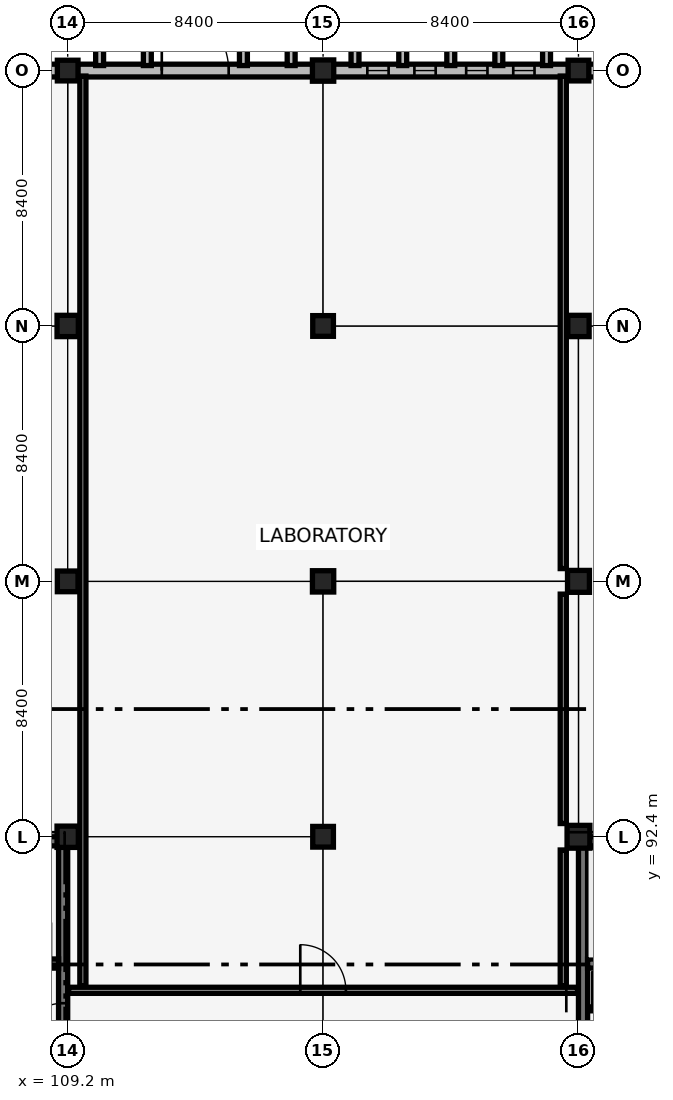
"""IFC4 building model, lengths in metres.
Left out: names, types, materials, properties, quantities, classifications, styles, units other than length and angle.
Written with IfcOpenShell. Run it as: python <this file> out.ifc"""

import sys

from ifc_helpers import new_model, si_unit, direction, frame, frame_2d, origin, origin_2d, place, context, subcontext, project, spatial, rectangle, extrude, element, fill, save


model = new_model("IFC4")
c1 = context("Model", 3, precision=1e-05, world=origin(), true_north=direction((0.0, 1.0)))
c2 = subcontext(c1, "Body", "Model", "MODEL_VIEW")
j1 = project(units=[si_unit("LENGTHUNIT", "METRE"), si_unit("PLANEANGLEUNIT", "RADIAN")], contexts=[c1])
p1 = place(None, origin())
s1 = spatial("IfcSite", under=j1, at=p1, CompositionType="ELEMENT")
p2 = place(p1, origin())
s2 = spatial("IfcBuilding", under=s1, at=p2, CompositionType="ELEMENT")
p3 = place(p2, origin())
s3 = spatial("IfcBuildingStorey", under=s2, at=p3, CompositionType="ELEMENT", Elevation=0.0)
for number, where, z_axis, x_axis in (
    (1, (126.15, 92.25, 0.0), (0.0, 0.0, 1.0), (1.0, 0.0, 0.0)),
    (2, (126.15, 84.15, 0.0), (0.0, 0.0, 1.0), (0.0, 1.0, 0.0)),
):
    element("IfcWall", number, at=place(p3, frame(where, z_axis=z_axis, x_axis=x_axis)), inside=s3, PredefinedType="SHEAR", context=c2, shape_type="SweptSolid", body=[
        extrude(rectangle(XDim=8.1, YDim=0.3, at=frame_2d((4.05, 0.0))), origin(), (0.0, 0.0, 1.0), 5.14),
    ])
p4 = place(p3, frame((126.3, 88.23, 0.0), z_axis=(0.0, 0.0, 1.0), x_axis=(1.0, 0.0, 0.0)))
e3 = element("IfcWall", 3, at=p4, inside=s3, PredefinedType="SHEAR", context=c2, shape_type="SweptSolid", body=[
    extrude(rectangle(XDim=7.8, YDim=0.3, at=frame_2d((3.9, 0.0))), origin(), (0.0, 0.0, 1.0), 5.14),
])
p5 = place(p4, frame((6.2, 0.0, 0.0)))
e4 = element("IfcOpeningElement", 4, at=p5, cuts=e3, PredefinedType="OPENING", context=c2, shape_type="SweptSolid", body=[
    extrude(rectangle(XDim=1.35, YDim=2.15, at=frame_2d((0.675, 1.075))), frame((0.0, 0.16, 0.0), z_axis=(0.0, -1.0, 0.0), x_axis=(1.0, 0.0, 0.0)), (0.0, 0.0, 1.0), 0.32),
])
p6 = place(p3, frame((100.95, 92.25, 0.0), z_axis=(0.0, 0.0, 1.0), x_axis=(1.0, 0.0, 0.0)))
e5 = element("IfcWall", 5, at=p6, inside=s3, PredefinedType="SHEAR", context=c2, shape_type="SweptSolid", body=[
    extrude(rectangle(XDim=8.1, YDim=0.3, at=frame_2d((4.05, 0.0))), origin(), (0.0, 0.0, 1.0), 5.14),
])
p7 = place(p3, frame((109.05, 84.15, 0.0), z_axis=(0.0, 0.0, 1.0), x_axis=(0.0, 1.0, 0.0)))
e6 = element("IfcWall", 6, at=p7, inside=s3, PredefinedType="SHEAR", context=c2, shape_type="SweptSolid", body=[
    extrude(rectangle(XDim=8.1, YDim=0.3, at=frame_2d((4.05, 0.0))), origin(), (0.0, 0.0, 1.0), 5.14),
])
p8 = place(p7, frame((1.325, 0.0, 0.0)))
e7 = element("IfcOpeningElement", 7, at=p8, cuts=e6, PredefinedType="OPENING", context=c2, shape_type="SweptSolid", body=[
    extrude(rectangle(XDim=1.45, YDim=2.15, at=frame_2d((0.725, 1.075))), frame((0.0, 0.16, 0.0), z_axis=(0.0, -1.0, 0.0), x_axis=(1.0, 0.0, 0.0)), (0.0, 0.0, 1.0), 0.32),
])
p9 = place(p3, frame((101.1, 88.23, 0.0), z_axis=(0.0, 0.0, 1.0), x_axis=(1.0, 0.0, 0.0)))
e8 = element("IfcWall", 8, at=p9, inside=s3, PredefinedType="SHEAR", context=c2, shape_type="SweptSolid", body=[
    extrude(rectangle(XDim=7.8, YDim=0.3, at=frame_2d((3.9, 0.0))), origin(), (0.0, 0.0, 1.0), 5.14),
])
p10 = place(p9, frame((6.2, 0.0, 0.0)))
e9 = element("IfcOpeningElement", 9, at=p10, cuts=e8, PredefinedType="OPENING", context=c2, shape_type="SweptSolid", body=[
    extrude(rectangle(XDim=1.35, YDim=2.15, at=frame_2d((0.675, 1.075))), frame((0.0, 0.16, 0.0), z_axis=(0.0, -1.0, 0.0), x_axis=(1.0, 0.0, 0.0)), (0.0, 0.0, 1.0), 0.32),
])
p11 = place(p3, frame((109.2, 92.4, 0.0), z_axis=(0.0, 0.0, 1.0), x_axis=(1.0, 0.0, 0.0)))
e10 = element("IfcColumn", 10, at=p11, inside=s3, PredefinedType="COLUMN", context=c2, shape_type="SweptSolid", body=[
    extrude(rectangle(XDim=0.7, YDim=0.7, at=origin_2d()), origin(), (0.0, 0.0, 1.0), 5.14),
])
p12 = place(p3, frame((109.2, 100.8, 0.0), z_axis=(0.0, 0.0, 1.0), x_axis=(1.0, 0.0, 0.0)))
e11 = element("IfcColumn", 11, at=p12, inside=s3, PredefinedType="COLUMN", context=c2, shape_type="SweptSolid", body=[
    extrude(rectangle(XDim=0.68, YDim=0.68, at=origin_2d()), origin(), (0.0, 0.0, 1.0), 5.14),
])
p13 = place(p3, frame((109.2, 109.2, 0.0), z_axis=(0.0, 0.0, 1.0), x_axis=(1.0, 0.0, 0.0)))
e12 = element("IfcColumn", 12, at=p13, inside=s3, PredefinedType="COLUMN", context=c2, shape_type="SweptSolid", body=[
    extrude(rectangle(XDim=0.7, YDim=0.7, at=origin_2d()), origin(), (0.0, 0.0, 1.0), 5.14),
])
for number, where, z_axis, x_axis in (
    (13, (109.2, 117.6, 0.0), (0.0, 0.0, 1.0), (1.0, 0.0, 0.0)),
    (14, (117.6, 92.4, 0.0), (0.0, 0.0, 1.0), (1.0, 0.0, 0.0)),
):
    element("IfcColumn", number, at=place(p3, frame(where, z_axis=z_axis, x_axis=x_axis)), inside=s3, PredefinedType="COLUMN", context=c2, shape_type="SweptSolid", body=[
        extrude(rectangle(XDim=0.68, YDim=0.68, at=origin_2d()), origin(), (0.0, 0.0, 1.0), 5.14),
    ])
p14 = place(p3, frame((117.6, 100.8, 0.0), z_axis=(0.0, 0.0, 1.0), x_axis=(1.0, 0.0, 0.0)))
e15 = element("IfcColumn", 15, at=p14, inside=s3, PredefinedType="COLUMN", context=c2, shape_type="SweptSolid", body=[
    extrude(rectangle(XDim=0.7, YDim=0.7, at=origin_2d()), origin(), (0.0, 0.0, 1.0), 5.14),
])
p15 = place(p3, frame((117.6, 109.2, 0.0), z_axis=(0.0, 0.0, 1.0), x_axis=(1.0, 0.0, 0.0)))
e16 = element("IfcColumn", 16, at=p15, inside=s3, PredefinedType="COLUMN", context=c2, shape_type="SweptSolid", body=[
    extrude(rectangle(XDim=0.68, YDim=0.68, at=origin_2d()), origin(), (0.0, 0.0, 1.0), 5.14),
])
p16 = place(p3, frame((117.6, 117.6, 0.0), z_axis=(0.0, 0.0, 1.0), x_axis=(1.0, 0.0, 0.0)))
e17 = element("IfcColumn", 17, at=p16, inside=s3, PredefinedType="COLUMN", context=c2, shape_type="SweptSolid", body=[
    extrude(rectangle(XDim=0.7, YDim=0.7, at=origin_2d()), origin(), (0.0, 0.0, 1.0), 5.14),
])
p17 = place(p3, frame((126.0, 92.4, 0.0), z_axis=(0.0, 0.0, 1.0), x_axis=(1.0, 0.0, 0.0)))
e18 = element("IfcColumn", 18, at=p17, inside=s3, PredefinedType="COLUMN", context=c2, shape_type="SweptSolid", body=[
    extrude(rectangle(XDim=0.75, YDim=0.75, at=origin_2d()), origin(), (0.0, 0.0, 1.0), 5.14),
])
p18 = place(p3, frame((126.0, 100.8, 0.0), z_axis=(0.0, 0.0, 1.0), x_axis=(1.0, 0.0, 0.0)))
e19 = element("IfcColumn", 19, at=p18, inside=s3, PredefinedType="COLUMN", context=c2, shape_type="SweptSolid", body=[
    extrude(rectangle(XDim=0.72, YDim=0.72, at=origin_2d()), origin(), (0.0, 0.0, 1.0), 5.14),
])
p19 = place(p3, frame((126.0, 109.2, 0.0), z_axis=(0.0, 0.0, 1.0), x_axis=(1.0, 0.0, 0.0)))
e20 = element("IfcColumn", 20, at=p19, inside=s3, PredefinedType="COLUMN", context=c2, shape_type="SweptSolid", body=[
    extrude(rectangle(XDim=0.7, YDim=0.7, at=origin_2d()), origin(), (0.0, 0.0, 1.0), 5.14),
])
p20 = place(p3, frame((126.0, 117.6, 0.0), z_axis=(0.0, 0.0, 1.0), x_axis=(1.0, 0.0, 0.0)))
e21 = element("IfcColumn", 21, at=p20, inside=s3, PredefinedType="COLUMN", context=c2, shape_type="SweptSolid", body=[
    extrude(rectangle(XDim=0.68, YDim=0.68, at=origin_2d()), origin(), (0.0, 0.0, 1.0), 5.14),
])
p21 = place(p3, frame((101.135, 117.6, 0.0), z_axis=(0.0, 0.0, 1.0), x_axis=(1.0, 0.0, 0.0)))
e22 = element("IfcWall", 22, at=p21, inside=s3, PredefinedType="SOLIDWALL", context=c2, shape_type="SweptSolid", body=[
    extrude(rectangle(XDim=7.74, YDim=0.42, at=frame_2d((3.87, 0.0))), origin(), (0.0, 0.0, 1.0), 4.4),
])
p22 = place(p3, frame((109.525, 117.6, 0.0), z_axis=(0.0, 0.0, 1.0), x_axis=(1.0, 0.0, 0.0)))
e23 = element("IfcWall", 23, at=p22, inside=s3, PredefinedType="SOLIDWALL", context=c2, shape_type="SweptSolid", body=[
    extrude(rectangle(XDim=7.74, YDim=0.42, at=frame_2d((3.87, 0.0))), origin(), (0.0, 0.0, 1.0), 4.4),
])
p23 = place(p22, frame((2.77, 0.0, 0.0)))
e24 = element("IfcOpeningElement", 24, at=p23, cuts=e23, PredefinedType="OPENING", context=c2, shape_type="SweptSolid", body=[
    extrude(rectangle(XDim=2.2, YDim=2.4, at=frame_2d((1.1, 1.2))), frame((0.0, 0.22, 0.0), z_axis=(0.0, -1.0, 0.0), x_axis=(1.0, 0.0, 0.0)), (0.0, 0.0, 1.0), 0.44),
])
for number, where, z_axis, x_axis in (
    (25, (110.25, 117.765, -0.25), (0.0, 0.0, 1.0), (0.0, 1.0, 0.0)),
    (26, (111.82, 117.765, -0.25), (0.0, 0.0, 1.0), (0.0, 1.0, 0.0)),
    (27, (114.98, 117.765, -0.25), (0.0, 0.0, 1.0), (0.0, 1.0, 0.0)),
    (28, (116.55, 117.765, -0.25), (0.0, 0.0, 1.0), (0.0, 1.0, 0.0)),
):
    element("IfcWall", number, at=place(p3, frame(where, z_axis=z_axis, x_axis=x_axis)), inside=s3, PredefinedType="SOLIDWALL", context=c2, shape_type="SweptSolid", body=[
        extrude(rectangle(XDim=0.7, YDim=0.26, at=frame_2d((0.35, 0.0))), origin(), (0.0, 0.0, 1.0), 5.69),
    ])
p24 = place(p3, frame((117.935, 117.6, 0.0), z_axis=(0.0, 0.0, 1.0), x_axis=(1.0, 0.0, 0.0)))
e29 = element("IfcWall", 29, at=p24, inside=s3, PredefinedType="SOLIDWALL", context=c2, shape_type="SweptSolid", body=[
    extrude(rectangle(XDim=7.74, YDim=0.42, at=frame_2d((3.87, 0.0))), origin(), (0.0, 0.0, 1.0), 4.4),
])
p25 = place(p24, frame((1.121, 0.0, 0.75)))
e30 = element("IfcOpeningElement", 30, at=p25, cuts=e29, PredefinedType="OPENING", context=c2, shape_type="SweptSolid", body=[
    extrude(rectangle(XDim=0.7, YDim=1.95, at=frame_2d((0.35, 0.975))), frame((0.0, 0.22, 0.0), z_axis=(0.0, -1.0, 0.0), x_axis=(1.0, 0.0, 0.0)), (0.0, 0.0, 1.0), 0.44),
])
p26 = place(p24, frame((2.669, 0.0, 0.75)))
e31 = element("IfcOpeningElement", 31, at=p26, cuts=e29, PredefinedType="OPENING", context=c2, shape_type="SweptSolid", body=[
    extrude(rectangle(XDim=0.7, YDim=1.95, at=frame_2d((0.35, 0.975))), frame((0.0, 0.22, 0.0), z_axis=(0.0, -1.0, 0.0), x_axis=(1.0, 0.0, 0.0)), (0.0, 0.0, 1.0), 0.44),
])
p27 = place(p24, frame((4.371, 0.0, 0.75)))
e32 = element("IfcOpeningElement", 32, at=p27, cuts=e29, PredefinedType="OPENING", context=c2, shape_type="SweptSolid", body=[
    extrude(rectangle(XDim=0.7, YDim=1.95, at=frame_2d((0.35, 0.975))), frame((0.0, 0.22, 0.0), z_axis=(0.0, -1.0, 0.0), x_axis=(1.0, 0.0, 0.0)), (0.0, 0.0, 1.0), 0.44),
])
p28 = place(p24, frame((5.919, 0.0, 0.75)))
e33 = element("IfcOpeningElement", 33, at=p28, cuts=e29, PredefinedType="OPENING", context=c2, shape_type="SweptSolid", body=[
    extrude(rectangle(XDim=0.7, YDim=1.95, at=frame_2d((0.35, 0.975))), frame((0.0, 0.22, 0.0), z_axis=(0.0, -1.0, 0.0), x_axis=(1.0, 0.0, 0.0)), (0.0, 0.0, 1.0), 0.44),
])
for number, where, z_axis, x_axis in (
    (34, (118.65, 117.765, -0.25), (0.0, 0.0, 1.0), (0.0, 1.0, 0.0)),
    (35, (120.22, 117.765, -0.25), (0.0, 0.0, 1.0), (0.0, 1.0, 0.0)),
    (36, (121.8, 117.765, -0.25), (0.0, 0.0, 1.0), (0.0, 1.0, 0.0)),
    (37, (123.38, 117.765, -0.25), (0.0, 0.0, 1.0), (0.0, 1.0, 0.0)),
    (38, (124.95, 117.765, -0.25), (0.0, 0.0, 1.0), (0.0, 1.0, 0.0)),
):
    element("IfcWall", number, at=place(p3, frame(where, z_axis=z_axis, x_axis=x_axis)), inside=s3, PredefinedType="SOLIDWALL", context=c2, shape_type="SweptSolid", body=[
        extrude(rectangle(XDim=0.7, YDim=0.26, at=frame_2d((0.35, 0.0))), origin(), (0.0, 0.0, 1.0), 5.69),
    ])
p29 = place(p3, frame((126.325, 117.6, 0.0), z_axis=(0.0, 0.0, 1.0), x_axis=(1.0, 0.0, 0.0)))
e39 = element("IfcWall", 39, at=p29, inside=s3, PredefinedType="SOLIDWALL", context=c2, shape_type="SweptSolid", body=[
    extrude(rectangle(XDim=7.74, YDim=0.42, at=frame_2d((3.87, 0.0))), origin(), (0.0, 0.0, 1.0), 4.4),
])
p30 = place(p3, frame((126.32, 86.74, 0.0), z_axis=(0.0, 0.0, 1.0), x_axis=(1.0, 0.0, 0.0)))
e40 = element("IfcWall", 40, at=p30, inside=s3, PredefinedType="PARTITIONING", context=c2, shape_type="SweptSolid", body=[
    extrude(rectangle(XDim=1.62, YDim=0.13, at=frame_2d((0.81, 0.0))), origin(), (0.0, 0.0, 1.0), 5.14),
])
p31 = place(p3, frame((109.23, 87.35, 0.0), z_axis=(0.0, 0.0, 1.0), x_axis=(1.0, 0.0, 0.0)))
e41 = element("IfcWall", 41, at=p31, inside=s3, PredefinedType="PARTITIONING", context=c2, shape_type="SweptSolid", body=[
    extrude(rectangle(XDim=16.74, YDim=0.2, at=frame_2d((8.37, 0.0))), origin(), (0.0, 0.0, 1.0), 4.49),
])
p32 = place(p31, frame((7.62, 0.0, 0.0)))
e42 = element("IfcOpeningElement", 42, at=p32, cuts=e41, PredefinedType="OPENING", context=c2, shape_type="SweptSolid", body=[
    extrude(rectangle(XDim=1.5, YDim=2.2, at=frame_2d((0.75, 1.1))), frame((0.0, 0.11, 0.0), z_axis=(0.0, -1.0, 0.0), x_axis=(1.0, 0.0, 0.0)), (0.0, 0.0, 1.0), 0.22),
])
p33 = place(p3, frame((109.7, 87.5, 0.0), z_axis=(0.0, 0.0, 1.0), x_axis=(0.0, 1.0, 0.0)))
e43 = element("IfcWall", 43, at=p33, inside=s3, PredefinedType="PARTITIONING", context=c2, shape_type="SweptSolid", body=[
    extrude(rectangle(XDim=29.92, YDim=0.2, at=frame_2d((14.96, 0.0))), origin(), (0.0, 0.0, 1.0), 4.36),
])
p34 = place(p3, frame((125.5, 87.5, 0.0), z_axis=(0.0, 0.0, 1.0), x_axis=(0.0, 1.0, 0.0)))
e44 = element("IfcWall", 44, at=p34, inside=s3, PredefinedType="PARTITIONING", context=c2, shape_type="SweptSolid", body=[
    extrude(rectangle(XDim=4.465, YDim=0.2, at=frame_2d((2.232, 0.0))), origin(), (0.0, 0.0, 1.0), 4.59),
])
p35 = place(p3, frame((125.5, 92.835, 0.0), z_axis=(0.0, 0.0, 1.0), x_axis=(0.0, 1.0, 0.0)))
e45 = element("IfcWall", 45, at=p35, inside=s3, PredefinedType="PARTITIONING", context=c2, shape_type="SweptSolid", body=[
    extrude(rectangle(XDim=7.545, YDim=0.2, at=frame_2d((3.772, 0.0))), origin(), (0.0, 0.0, 1.0), 4.58),
])
p36 = place(p3, frame((125.5, 101.22, 0.0), z_axis=(0.0, 0.0, 1.0), x_axis=(0.0, 1.0, 0.0)))
e46 = element("IfcWall", 46, at=p36, inside=s3, PredefinedType="PARTITIONING", context=c2, shape_type="SweptSolid", body=[
    extrude(rectangle(XDim=16.2, YDim=0.2, at=frame_2d((8.1, 0.0))), origin(), (0.0, 0.0, 1.0), 4.4),
])
p37 = place(p23, origin())
e47 = element("IfcDoor", 47, at=p37, inside=s3, OperationType="DOUBLE_DOOR_SINGLE_SWING", PredefinedType="DOOR", context=c2, shape_type="SweptSolid", body=[
    extrude(rectangle(XDim=2.2, YDim=2.4, at=frame_2d((1.1, 1.2))), frame((0.0, 0.025, 0.0), z_axis=(0.0, -1.0, 0.0), x_axis=(1.0, 0.0, 0.0)), (0.0, 0.0, 1.0), 0.05),
])
fill(e24, e47)
p38 = place(p25, origin())
e48 = element("IfcWindow", 48, at=p38, inside=s3, PartitioningType="DOUBLE_PANEL_VERTICAL", PredefinedType="WINDOW", context=c2, shape_type="SweptSolid", body=[
    extrude(rectangle(XDim=0.7, YDim=1.95, at=frame_2d((0.35, 0.975))), frame((0.0, 0.03, 0.0), z_axis=(0.0, -1.0, 0.0), x_axis=(1.0, 0.0, 0.0)), (0.0, 0.0, 1.0), 0.06),
])
fill(e30, e48)
p39 = place(p26, origin())
e49 = element("IfcWindow", 49, at=p39, inside=s3, PartitioningType="DOUBLE_PANEL_VERTICAL", PredefinedType="WINDOW", context=c2, shape_type="SweptSolid", body=[
    extrude(rectangle(XDim=0.7, YDim=1.95, at=frame_2d((0.35, 0.975))), frame((0.0, 0.03, 0.0), z_axis=(0.0, -1.0, 0.0), x_axis=(1.0, 0.0, 0.0)), (0.0, 0.0, 1.0), 0.06),
])
fill(e31, e49)
p40 = place(p27, origin())
e50 = element("IfcWindow", 50, at=p40, inside=s3, PartitioningType="DOUBLE_PANEL_VERTICAL", PredefinedType="WINDOW", context=c2, shape_type="SweptSolid", body=[
    extrude(rectangle(XDim=0.7, YDim=1.95, at=frame_2d((0.35, 0.975))), frame((0.0, 0.03, 0.0), z_axis=(0.0, -1.0, 0.0), x_axis=(1.0, 0.0, 0.0)), (0.0, 0.0, 1.0), 0.06),
])
fill(e32, e50)
p41 = place(p28, origin())
e51 = element("IfcWindow", 51, at=p41, inside=s3, PartitioningType="DOUBLE_PANEL_VERTICAL", PredefinedType="WINDOW", context=c2, shape_type="SweptSolid", body=[
    extrude(rectangle(XDim=0.7, YDim=1.95, at=frame_2d((0.35, 0.975))), frame((0.0, 0.03, 0.0), z_axis=(0.0, -1.0, 0.0), x_axis=(1.0, 0.0, 0.0)), (0.0, 0.0, 1.0), 0.06),
])
fill(e33, e51)
p42 = place(p8, origin())
e52 = element("IfcDoor", 52, at=p42, inside=s3, OperationType="DOUBLE_DOOR_SINGLE_SWING", PredefinedType="DOOR", context=c2, shape_type="SweptSolid", body=[
    extrude(rectangle(XDim=1.45, YDim=2.15, at=frame_2d((0.725, 1.075))), frame((0.0, 0.025, 0.0), z_axis=(0.0, -1.0, 0.0), x_axis=(1.0, 0.0, 0.0)), (0.0, 0.0, 1.0), 0.05),
])
fill(e7, e52)
p43 = place(p32, origin())
e53 = element("IfcDoor", 53, at=p43, inside=s3, OperationType="DOUBLE_DOOR_SINGLE_SWING", PredefinedType="DOOR", context=c2, shape_type="SweptSolid", body=[
    extrude(rectangle(XDim=1.5, YDim=2.2, at=frame_2d((0.75, 1.1))), frame((0.0, 0.025, 0.0), z_axis=(0.0, -1.0, 0.0), x_axis=(1.0, 0.0, 0.0)), (0.0, 0.0, 1.0), 0.05),
])
fill(e42, e53)
save(model, sys.argv[1])
